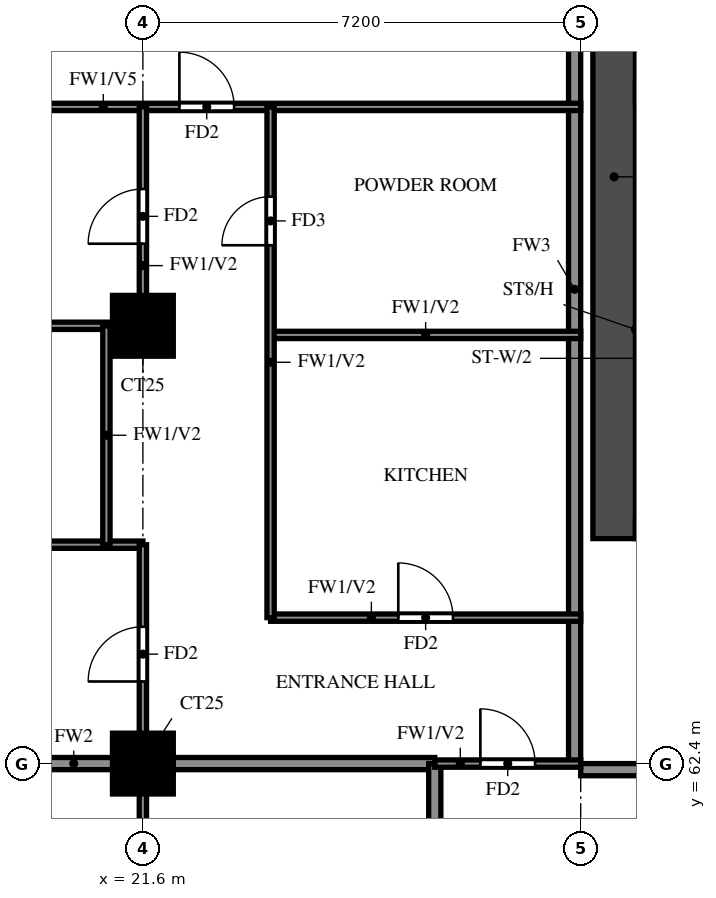
"""IFC4 building model, lengths in metres.
Left out: names, types, materials, properties, quantities, classifications, styles, units other than length and angle.
Written with IfcOpenShell. Run it as: python <this file> out.ifc"""

import sys

from ifc_helpers import new_model, si_unit, direction, frame, frame_2d, origin, origin_2d, place, context, subcontext, project, spatial, rectangle, extrude, source, transform, mapped, element, fill, save


model = new_model("IFC4")
c1 = context("Model", 3, precision=1e-05, world=origin(), true_north=direction((0.0, 1.0)))
c2 = subcontext(c1, "Body", "Model", "MODEL_VIEW")
j1 = project(units=[si_unit("LENGTHUNIT", "METRE"), si_unit("PLANEANGLEUNIT", "RADIAN")], contexts=[c1])
p1 = place(None, origin())
s1 = spatial("IfcSite", under=j1, at=p1, CompositionType="ELEMENT")
p2 = place(p1, origin())
s2 = spatial("IfcBuilding", under=s1, at=p2, CompositionType="ELEMENT")
p3 = place(p2, frame((0.0, 0.0, 164.0)))
s3 = spatial("IfcBuildingStorey", under=s2, at=p3, CompositionType="ELEMENT", Elevation=164.0)
m1 = source(origin(), c2, "Body", "SweptSolid", [
    extrude(rectangle(XDim=1.0, YDim=1.0, at=origin_2d()), origin(), (0.0, 0.0, 1.0), 3.2),
])
for number, where, z_axis, x_axis in (
    (1, (21.6, 62.4, 0.0), (0.0, 0.0, 1.0), (1.0, 0.0, 0.0)),
    (2, (21.6, 69.6, 0.0), (0.0, 0.0, 1.0), (1.0, 0.0, 0.0)),
):
    element("IfcColumn", number, at=place(p3, frame(where, z_axis=z_axis, x_axis=x_axis)), inside=s3, PredefinedType="COLUMN", context=c2, shape_type="MappedRepresentation", body=[
        mapped(m1, transform((0.0, 0.0, 0.0))),
    ])
p4 = place(p3, frame((29.35, 66.1, 0.0), z_axis=(0.0, 0.0, 1.0), x_axis=(0.0, 1.0, 0.0)))
e3 = element("IfcWall", 3, at=p4, inside=s3, PredefinedType="SHEAR", context=c2, shape_type="SweptSolid", body=[
    extrude(rectangle(XDim=11.9, YDim=0.7, at=frame_2d((5.95, 0.0))), origin(), (0.0, 0.0, 1.0), 3.2),
])
p5 = place(p3, frame((28.8, 62.3, 0.0), z_axis=(0.0, 0.0, 1.0), x_axis=(1.0, 0.0, 0.0)))
e4 = element("IfcWall", 4, at=p5, inside=s3, PredefinedType="SOLIDWALL", context=c2, shape_type="SweptSolid", body=[
    extrude(rectangle(XDim=4.8, YDim=0.2, at=frame_2d((2.4, 0.0))), origin(), (0.0, 0.0, 1.0), 3.2),
])
p6 = place(p3, frame((28.7, 62.4, 0.0), z_axis=(0.0, 0.0, 1.0), x_axis=(0.0, 1.0, 0.0)))
e5 = element("IfcWall", 5, at=p6, inside=s3, PredefinedType="SOLIDWALL", context=c2, shape_type="SweptSolid", body=[
    extrude(rectangle(XDim=15.6, YDim=0.2, at=frame_2d((7.8, 0.0))), origin(), (0.0, 0.0, 1.0), 3.2),
])
p7 = place(p3, frame((14.525, 62.4, 0.0), z_axis=(0.0, 0.0, 1.0), x_axis=(1.0, 0.0, 0.0)))
e6 = element("IfcWall", 6, at=p7, inside=s3, PredefinedType="SOLIDWALL", context=c2, shape_type="SweptSolid", body=[
    extrude(rectangle(XDim=11.875, YDim=0.2, at=frame_2d((5.938, 0.0))), origin(), (0.0, 0.0, 1.0), 3.2),
])
p8 = place(p3, frame((26.4, 60.0, 0.0), z_axis=(0.0, 0.0, 1.0), x_axis=(0.0, 1.0, 0.0)))
e7 = element("IfcWall", 7, at=p8, inside=s3, PredefinedType="SOLIDWALL", context=c2, shape_type="SweptSolid", body=[
    extrude(rectangle(XDim=2.4, YDim=0.2, at=frame_2d((1.2, 0.0))), origin(), (0.0, 0.0, 1.0), 3.2),
])
p9 = place(p3, frame((26.4, 62.4, 0.0), z_axis=(0.0, 0.0, 1.0), x_axis=(1.0, 0.0, 0.0)))
e8 = element("IfcWall", 8, at=p9, inside=s3, PredefinedType="PARTITIONING", context=c2, shape_type="SweptSolid", body=[
    extrude(rectangle(XDim=2.4, YDim=0.12, at=frame_2d((1.2, 0.0))), origin(), (0.0, 0.0, 1.0), 3.2),
])
p10 = place(p9, frame((0.75, 0.0, 0.0)))
e9 = element("IfcOpeningElement", 9, at=p10, cuts=e8, PredefinedType="OPENING", context=c2, shape_type="SweptSolid", body=[
    extrude(rectangle(XDim=0.9, YDim=2.1, at=frame_2d((0.45, 1.05))), frame((0.0, 0.07, 0.0), z_axis=(0.0, -1.0, 0.0), x_axis=(1.0, 0.0, 0.0)), (0.0, 0.0, 1.0), 0.14),
])
p11 = place(p3, frame((23.7, 64.8, 0.0), z_axis=(0.0, 0.0, 1.0), x_axis=(1.0, 0.0, 0.0)))
e10 = element("IfcWall", 10, at=p11, inside=s3, PredefinedType="PARTITIONING", context=c2, shape_type="SweptSolid", body=[
    extrude(rectangle(XDim=5.1, YDim=0.12, at=frame_2d((2.55, 0.0))), origin(), (0.0, 0.0, 1.0), 3.2),
])
p12 = place(p11, frame((2.1, 0.0, 0.0)))
e11 = element("IfcOpeningElement", 11, at=p12, cuts=e10, PredefinedType="OPENING", context=c2, shape_type="SweptSolid", body=[
    extrude(rectangle(XDim=0.9, YDim=2.1, at=frame_2d((0.45, 1.05))), frame((0.0, 0.07, 0.0), z_axis=(0.0, -1.0, 0.0), x_axis=(1.0, 0.0, 0.0)), (0.0, 0.0, 1.0), 0.14),
])
p13 = place(p3, frame((14.525, 66.0, 0.0), z_axis=(0.0, 0.0, 1.0), x_axis=(1.0, 0.0, 0.0)))
e12 = element("IfcWall", 12, at=p13, inside=s3, PredefinedType="PARTITIONING", context=c2, shape_type="SweptSolid", body=[
    extrude(rectangle(XDim=7.075, YDim=0.12, at=frame_2d((3.538, 0.0))), origin(), (0.0, 0.0, 1.0), 2.3),
])
p14 = place(p13, frame((2.837, 0.0, 0.0)))
e13 = element("IfcOpeningElement", 13, at=p14, cuts=e12, PredefinedType="OPENING", context=c2, shape_type="SweptSolid", body=[
    extrude(rectangle(XDim=0.8, YDim=2.1, at=frame_2d((0.4, 1.05))), frame((0.0, 0.07, 0.0), z_axis=(0.0, -1.0, 0.0), x_axis=(1.0, 0.0, 0.0)), (0.0, 0.0, 1.0), 0.14),
])
p15 = place(p3, frame((23.7, 69.45, 0.0), z_axis=(0.0, 0.0, 1.0), x_axis=(1.0, 0.0, 0.0)))
e14 = element("IfcWall", 14, at=p15, inside=s3, PredefinedType="PARTITIONING", context=c2, shape_type="SweptSolid", body=[
    extrude(rectangle(XDim=5.1, YDim=0.12, at=frame_2d((2.55, 0.0))), origin(), (0.0, 0.0, 1.0), 3.2),
])
p16 = place(p3, frame((14.525, 69.6, 0.0), z_axis=(0.0, 0.0, 1.0), x_axis=(1.0, 0.0, 0.0)))
e15 = element("IfcWall", 15, at=p16, inside=s3, PredefinedType="PARTITIONING", context=c2, shape_type="SweptSolid", body=[
    extrude(rectangle(XDim=7.075, YDim=0.12, at=frame_2d((3.538, 0.0))), origin(), (0.0, 0.0, 1.0), 3.2),
])
p17 = place(p3, frame((14.525, 73.2, 0.0), z_axis=(0.0, 0.0, 1.0), x_axis=(1.0, 0.0, 0.0)))
e16 = element("IfcWall", 16, at=p17, inside=s3, PredefinedType="PARTITIONING", context=c2, shape_type="SweptSolid", body=[
    extrude(rectangle(XDim=14.275, YDim=0.12, at=frame_2d((7.138, 0.0))), origin(), (0.0, 0.0, 1.0), 2.3),
])
p18 = place(p17, frame((7.675, 0.0, 0.0)))
e17 = element("IfcOpeningElement", 17, at=p18, cuts=e16, PredefinedType="OPENING", context=c2, shape_type="SweptSolid", body=[
    extrude(rectangle(XDim=0.9, YDim=2.1, at=frame_2d((0.45, 1.05))), frame((0.0, 0.07, 0.0), z_axis=(0.0, -1.0, 0.0), x_axis=(1.0, 0.0, 0.0)), (0.0, 0.0, 1.0), 0.14),
])
p19 = place(p3, frame((21.0, 66.0, 0.0), z_axis=(0.0, 0.0, 1.0), x_axis=(0.0, 1.0, 0.0)))
e18 = element("IfcWall", 18, at=p19, inside=s3, PredefinedType="PARTITIONING", context=c2, shape_type="SweptSolid", body=[
    extrude(rectangle(XDim=3.6, YDim=0.12, at=frame_2d((1.8, 0.0))), origin(), (0.0, 0.0, 1.0), 3.2),
])
p20 = place(p3, frame((21.6, 55.2, 0.0), z_axis=(0.0, 0.0, 1.0), x_axis=(0.0, 1.0, 0.0)))
e19 = element("IfcWall", 19, at=p20, inside=s3, PredefinedType="PARTITIONING", context=c2, shape_type="SweptSolid", body=[
    extrude(rectangle(XDim=10.8, YDim=0.12, at=frame_2d((5.4, 0.0))), origin(), (0.0, 0.0, 1.0), 3.2),
])
p21 = place(p20, frame((2.85, 0.0, 0.0)))
e20 = element("IfcOpeningElement", 20, at=p21, cuts=e19, PredefinedType="OPENING", context=c2, shape_type="SweptSolid", body=[
    extrude(rectangle(XDim=1.5, YDim=2.1, at=frame_2d((0.75, 1.05))), frame((0.0, 0.07, 0.0), z_axis=(0.0, -1.0, 0.0), x_axis=(1.0, 0.0, 0.0)), (0.0, 0.0, 1.0), 0.14),
])
p22 = place(p20, frame((8.55, 0.0, 0.0)))
e21 = element("IfcOpeningElement", 21, at=p22, cuts=e19, PredefinedType="OPENING", context=c2, shape_type="SweptSolid", body=[
    extrude(rectangle(XDim=0.9, YDim=2.1, at=frame_2d((0.45, 1.05))), frame((0.0, 0.07, 0.0), z_axis=(0.0, -1.0, 0.0), x_axis=(1.0, 0.0, 0.0)), (0.0, 0.0, 1.0), 0.14),
])
p23 = place(p3, frame((21.6, 69.6, 0.0), z_axis=(0.0, 0.0, 1.0), x_axis=(0.0, 1.0, 0.0)))
e22 = element("IfcWall", 22, at=p23, inside=s3, PredefinedType="PARTITIONING", context=c2, shape_type="SweptSolid", body=[
    extrude(rectangle(XDim=3.6, YDim=0.12, at=frame_2d((1.8, 0.0))), origin(), (0.0, 0.0, 1.0), 3.2),
])
p24 = place(p23, frame((1.35, 0.0, 0.0)))
e23 = element("IfcOpeningElement", 23, at=p24, cuts=e22, PredefinedType="OPENING", context=c2, shape_type="SweptSolid", body=[
    extrude(rectangle(XDim=0.9, YDim=2.1, at=frame_2d((0.45, 1.05))), frame((0.0, 0.07, 0.0), z_axis=(0.0, -1.0, 0.0), x_axis=(1.0, 0.0, 0.0)), (0.0, 0.0, 1.0), 0.14),
])
p25 = place(p3, frame((23.7, 64.8, 0.0), z_axis=(0.0, 0.0, 1.0), x_axis=(0.0, 1.0, 0.0)))
e24 = element("IfcWall", 24, at=p25, inside=s3, PredefinedType="PARTITIONING", context=c2, shape_type="SweptSolid", body=[
    extrude(rectangle(XDim=8.4, YDim=0.12, at=frame_2d((4.2, 0.0))), origin(), (0.0, 0.0, 1.0), 3.2),
])
p26 = place(p25, frame((6.125, 0.0, 0.0)))
e25 = element("IfcOpeningElement", 25, at=p26, cuts=e24, PredefinedType="OPENING", context=c2, shape_type="SweptSolid", body=[
    extrude(rectangle(XDim=0.8, YDim=2.1, at=frame_2d((0.4, 1.05))), frame((0.0, 0.07, 0.0), z_axis=(0.0, -1.0, 0.0), x_axis=(1.0, 0.0, 0.0)), (0.0, 0.0, 1.0), 0.14),
])
p27 = place(p10, origin())
e26 = element("IfcDoor", 26, at=p27, inside=s3, OperationType="SINGLE_SWING_LEFT", PredefinedType="DOOR", context=c2, shape_type="SweptSolid", body=[
    extrude(rectangle(XDim=0.9, YDim=2.1, at=frame_2d((0.45, 1.05))), frame((0.0, 0.025, 0.0), z_axis=(0.0, -1.0, 0.0), x_axis=(1.0, 0.0, 0.0)), (0.0, 0.0, 1.0), 0.05),
])
fill(e9, e26)
p28 = place(p22, origin())
e27 = element("IfcDoor", 27, at=p28, inside=s3, OperationType="SINGLE_SWING_RIGHT", PredefinedType="DOOR", context=c2, shape_type="SweptSolid", body=[
    extrude(rectangle(XDim=0.9, YDim=2.1, at=frame_2d((0.45, 1.05))), frame((0.0, 0.025, 0.0), z_axis=(0.0, -1.0, 0.0), x_axis=(1.0, 0.0, 0.0)), (0.0, 0.0, 1.0), 0.05),
])
fill(e21, e27)
p29 = place(p24, origin())
e28 = element("IfcDoor", 28, at=p29, inside=s3, OperationType="SINGLE_SWING_LEFT", PredefinedType="DOOR", context=c2, shape_type="SweptSolid", body=[
    extrude(rectangle(XDim=0.9, YDim=2.1, at=frame_2d((0.45, 1.05))), frame((0.0, 0.025, 0.0), z_axis=(0.0, -1.0, 0.0), x_axis=(1.0, 0.0, 0.0)), (0.0, 0.0, 1.0), 0.05),
])
fill(e23, e28)
p30 = place(p18, origin())
e29 = element("IfcDoor", 29, at=p30, inside=s3, OperationType="SINGLE_SWING_RIGHT", PredefinedType="DOOR", context=c2, shape_type="SweptSolid", body=[
    extrude(rectangle(XDim=0.9, YDim=2.1, at=frame_2d((0.45, 1.05))), frame((0.0, 0.025, 0.0), z_axis=(0.0, -1.0, 0.0), x_axis=(1.0, 0.0, 0.0)), (0.0, 0.0, 1.0), 0.05),
])
fill(e17, e29)
p31 = place(p12, origin())
e30 = element("IfcDoor", 30, at=p31, inside=s3, OperationType="SINGLE_SWING_LEFT", PredefinedType="DOOR", context=c2, shape_type="SweptSolid", body=[
    extrude(rectangle(XDim=0.9, YDim=2.1, at=frame_2d((0.45, 1.05))), frame((0.0, 0.025, 0.0), z_axis=(0.0, -1.0, 0.0), x_axis=(1.0, 0.0, 0.0)), (0.0, 0.0, 1.0), 0.05),
])
fill(e11, e30)
p32 = place(p26, origin())
e31 = element("IfcDoor", 31, at=p32, inside=s3, OperationType="SINGLE_SWING_LEFT", PredefinedType="DOOR", context=c2, shape_type="SweptSolid", body=[
    extrude(rectangle(XDim=0.8, YDim=2.1, at=frame_2d((0.4, 1.05))), frame((0.0, 0.025, 0.0), z_axis=(0.0, -1.0, 0.0), x_axis=(1.0, 0.0, 0.0)), (0.0, 0.0, 1.0), 0.05),
])
fill(e25, e31)
save(model, sys.argv[1])
